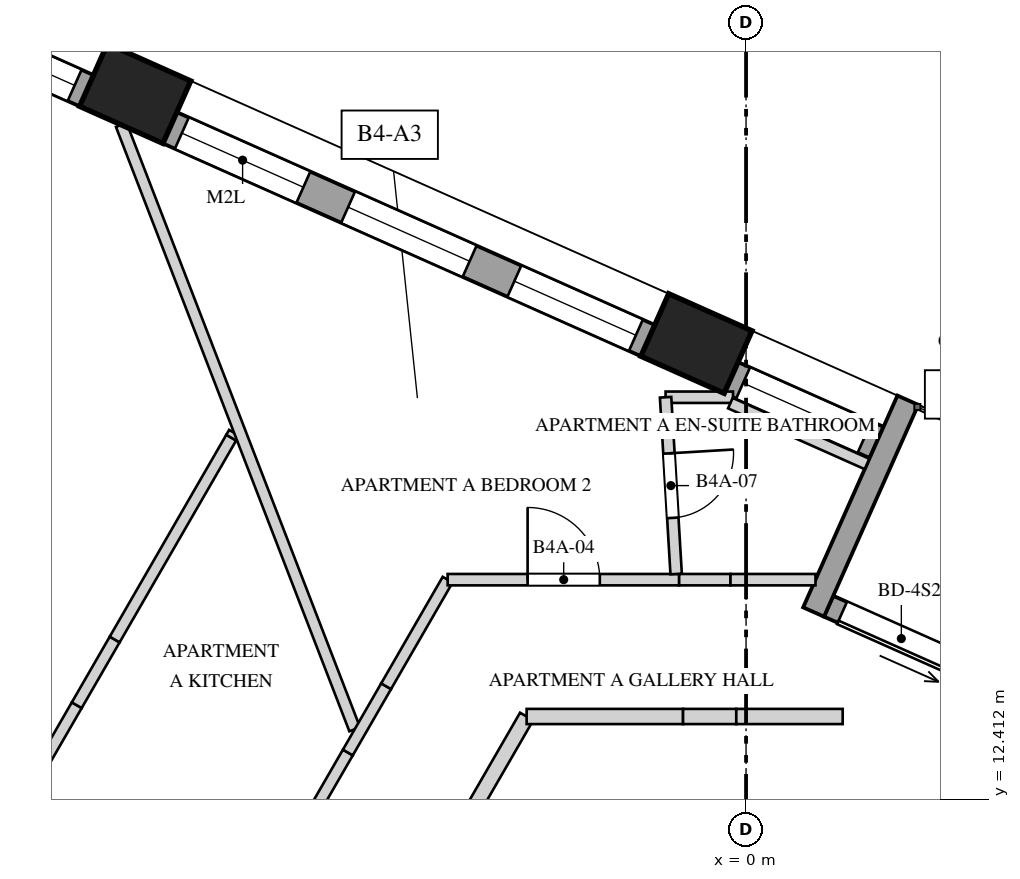
"""IFC4 building model, lengths in metres.
Left out: names, types, materials, properties, quantities, classifications, styles, units other than length and angle.
Written with IfcOpenShell. Run it as: python <this file> out.ifc"""

import sys

from ifc_helpers import new_model, si_unit, direction, frame, frame_2d, origin, origin_2d, place, context, subcontext, project, spatial, rectangle, extrude, element, fill, save


model = new_model("IFC4")
c1 = context("Model", 3, precision=1e-05, world=origin(), true_north=direction((0.0, 1.0)))
c2 = subcontext(c1, "Body", "Model", "MODEL_VIEW")
j1 = project(units=[si_unit("LENGTHUNIT", "METRE"), si_unit("PLANEANGLEUNIT", "RADIAN")], contexts=[c1])
p1 = place(None, origin())
s1 = spatial("IfcSite", under=j1, at=p1, CompositionType="ELEMENT")
p2 = place(p1, origin())
s2 = spatial("IfcBuilding", under=s1, at=p2, CompositionType="ELEMENT")
p3 = place(p2, frame((0.0, 0.0, 162.8)))
s3 = spatial("IfcBuildingStorey", under=s2, at=p3, CompositionType="ELEMENT", Elevation=162.8)
for number, where, z_axis, x_axis in (
    (1, (-0.653, 18.407, -0.35), (0.0, 0.0, 1.0), (-0.914, 0.407, 0.0)),
    (2, (-8.037, 21.694, -0.35), (0.0, 0.0, 1.0), (-0.914, 0.407, 0.0)),
):
    element("IfcColumn", number, at=place(p3, frame(where, z_axis=z_axis, x_axis=x_axis)), inside=s3, PredefinedType="COLUMN", context=c2, shape_type="SweptSolid", body=[
        extrude(rectangle(XDim=1.2, YDim=0.9, at=origin_2d()), origin(), (0.0, 0.0, 1.0), 4.35),
    ])
p4 = place(p3, frame((1.717, 17.105, 0.0), z_axis=(0.0, 0.0, 1.0), x_axis=(-0.913556597974, 0.40671162056, 0.0)))
e3 = element("IfcWall", 3, at=p4, inside=s3, PredefinedType="SOLIDWALL", context=c2, shape_type="SweptSolid", body=[
    extrude(rectangle(XDim=2.094, YDim=0.45, at=frame_2d((1.047, 0.0))), origin(), (0.0, 0.0, 1.0), 3.3),
])
p5 = place(p4, frame((0.172, 0.0, 0.5)))
e4 = element("IfcOpeningElement", 4, at=p5, cuts=e3, PredefinedType="OPENING", context=c2, shape_type="SweptSolid", body=[
    extrude(rectangle(XDim=1.75, YDim=2.65, at=frame_2d((0.875, 1.325))), frame((0.0, 0.235, 0.0), z_axis=(0.0, -1.0, 0.0), x_axis=(1.0, 0.0, 0.0)), (0.0, 0.0, 1.0), 0.47),
])
p6 = place(p3, frame((-1.292, 18.445, 0.0), z_axis=(0.0, 0.0, 1.0), x_axis=(-0.913543675585, 0.40674064562, 0.0)))
e5 = element("IfcWall", 5, at=p6, inside=s3, PredefinedType="SOLIDWALL", context=c2, shape_type="SweptSolid", body=[
    extrude(rectangle(XDim=6.883, YDim=0.45, at=frame_2d((3.441, 0.0))), origin(), (0.0, 0.0, 1.0), 3.3),
])
p7 = place(p6, frame((0.172, 0.0, 0.5)))
e6 = element("IfcOpeningElement", 6, at=p7, cuts=e5, PredefinedType="OPENING", context=c2, shape_type="SweptSolid", body=[
    extrude(rectangle(XDim=1.75, YDim=2.65, at=frame_2d((0.875, 1.325))), frame((0.0, 0.235, 0.0), z_axis=(0.0, -1.0, 0.0), x_axis=(1.0, 0.0, 0.0)), (0.0, 0.0, 1.0), 0.47),
])
p8 = place(p6, frame((2.566, 0.0, 0.5)))
e7 = element("IfcOpeningElement", 7, at=p8, cuts=e5, PredefinedType="OPENING", context=c2, shape_type="SweptSolid", body=[
    extrude(rectangle(XDim=1.75, YDim=2.65, at=frame_2d((0.875, 1.325))), frame((0.0, 0.235, 0.0), z_axis=(0.0, -1.0, 0.0), x_axis=(1.0, 0.0, 0.0)), (0.0, 0.0, 1.0), 0.47),
])
p9 = place(p6, frame((4.961, 0.0, 0.5)))
e8 = element("IfcOpeningElement", 8, at=p9, cuts=e5, PredefinedType="OPENING", context=c2, shape_type="SweptSolid", body=[
    extrude(rectangle(XDim=1.75, YDim=2.0, at=frame_2d((0.875, 1.0))), frame((0.0, 0.235, 0.0), z_axis=(0.0, -1.0, 0.0), x_axis=(1.0, 0.0, 0.0)), (0.0, 0.0, 1.0), 0.47),
])
p10 = place(p3, frame((-8.676, 21.733, 0.0), z_axis=(0.0, 0.0, 1.0), x_axis=(-0.913542682641, 0.406742875773, 0.0)))
e9 = element("IfcWall", 9, at=p10, inside=s3, PredefinedType="SOLIDWALL", context=c2, shape_type="SweptSolid", body=[
    extrude(rectangle(XDim=6.183, YDim=0.45, at=frame_2d((3.092, 0.0))), origin(), (0.0, 0.0, 1.0), 3.3),
])
p11 = place(p10, frame((0.172, 0.0, 0.5)))
e10 = element("IfcOpeningElement", 10, at=p11, cuts=e9, PredefinedType="OPENING", context=c2, shape_type="SweptSolid", body=[
    extrude(rectangle(XDim=1.75, YDim=2.65, at=frame_2d((0.875, 1.325))), frame((0.0, 0.235, 0.0), z_axis=(0.0, -1.0, 0.0), x_axis=(1.0, 0.0, 0.0)), (0.0, 0.0, 1.0), 0.47),
])
p12 = place(p10, frame((2.566, 0.0, 0.5)))
e11 = element("IfcOpeningElement", 11, at=p12, cuts=e9, PredefinedType="OPENING", context=c2, shape_type="SweptSolid", body=[
    extrude(rectangle(XDim=1.75, YDim=2.65, at=frame_2d((0.875, 1.325))), frame((0.0, 0.235, 0.0), z_axis=(0.0, -1.0, 0.0), x_axis=(1.0, 0.0, 0.0)), (0.0, 0.0, 1.0), 0.47),
])
p13 = place(p10, frame((4.936, 0.0, 0.5)))
e12 = element("IfcOpeningElement", 12, at=p13, cuts=e9, PredefinedType="OPENING", context=c2, shape_type="SweptSolid", body=[
    extrude(rectangle(XDim=1.1, YDim=2.0, at=frame_2d((0.55, 1.0))), frame((0.0, 0.235, 0.0), z_axis=(0.0, -1.0, 0.0), x_axis=(1.0, 0.0, 0.0)), (0.0, 0.0, 1.0), 0.47),
])
p14 = place(p3, frame((3.0, 14.099, 0.0), z_axis=(0.0, 0.0, 1.0), x_axis=(-0.913537312596, 0.406754936657, 0.0)))
e13 = element("IfcWall", 13, at=p14, inside=s3, PredefinedType="SOLIDWALL", context=c2, shape_type="SweptSolid", body=[
    extrude(rectangle(XDim=2.094, YDim=0.3, at=frame_2d((1.047, 0.0))), origin(), (0.0, 0.0, 1.0), 3.3),
])
p15 = place(p14, frame((0.197, 0.0, 0.0)))
e14 = element("IfcOpeningElement", 14, at=p15, cuts=e13, PredefinedType="OPENING", context=c2, shape_type="SweptSolid", body=[
    extrude(rectangle(XDim=1.7, YDim=2.45, at=frame_2d((0.85, 1.225))), frame((0.0, 0.16, 0.0), z_axis=(0.0, -1.0, 0.0), x_axis=(1.0, 0.0, 0.0)), (0.0, 0.0, 1.0), 0.32),
])
p16 = place(p3, frame((2.129, 17.661, 0.0), z_axis=(0.0, 0.0, 1.0), x_axis=(-0.406806804169, -0.913514216683, 0.0)))
e15 = element("IfcWall", 15, at=p16, inside=s3, PredefinedType="SOLIDWALL", context=c2, shape_type="SweptSolid", body=[
    extrude(rectangle(XDim=3.05, YDim=0.3, at=frame_2d((1.525, 0.0))), origin(), (0.0, 0.0, 1.0), 3.3),
])
p17 = place(p3, frame((-9.754, 12.005, 0.0), z_axis=(0.0, 0.0, 1.0), x_axis=(0.499971120268, 0.866042076863, 0.0)))
e16 = element("IfcWall", 16, at=p17, inside=s3, PredefinedType="PARTITIONING", context=c2, shape_type="SweptSolid", body=[
    extrude(rectangle(XDim=1.898, YDim=0.15, at=frame_2d((0.949, 0.0))), origin(), (0.0, 0.0, 1.0), 3.65),
])
p18 = place(p3, frame((-8.805, 13.649, 0.0), z_axis=(0.0, 0.0, 1.0), x_axis=(0.499955472713, 0.866051110099, 0.0)))
e17 = element("IfcWall", 17, at=p18, inside=s3, PredefinedType="PARTITIONING", context=c2, shape_type="SweptSolid", body=[
    extrude(rectangle(XDim=0.998, YDim=0.15, at=frame_2d((0.499, 0.0))), origin(), (0.0, 0.0, 1.0), 2.55),
])
p19 = place(p3, frame((-8.307, 14.513, 0.0), z_axis=(0.0, 0.0, 1.0), x_axis=(0.500034855457, 0.866005279042, 0.0)))
e18 = element("IfcWall", 18, at=p19, inside=s3, PredefinedType="PARTITIONING", context=c2, shape_type="SweptSolid", body=[
    extrude(rectangle(XDim=3.067, YDim=0.15, at=frame_2d((1.533, 0.0))), origin(), (0.0, 0.0, 1.0), 3.65),
])
p20 = place(p3, frame((-6.773, 17.168, 0.0), z_axis=(0.0, 0.0, 1.0), x_axis=(0.501423782413, 0.865201820635, 0.0)))
e19 = element("IfcWall", 19, at=p20, inside=s3, PredefinedType="PARTITIONING", context=c2, shape_type="SweptSolid", body=[
    extrude(rectangle(XDim=0.074, YDim=0.15, at=frame_2d((0.037, 0.0))), origin(), (0.0, 0.0, 1.0), 2.75),
])
p21 = place(p3, frame((-9.459, 12.366, 0.0), z_axis=(0.0, 0.0, 1.0), x_axis=(0.664589031093, -0.747209087037, 0.0)))
e20 = element("IfcWall", 20, at=p21, inside=s3, PredefinedType="PARTITIONING", context=c2, shape_type="SweptSolid", body=[
    extrude(rectangle(XDim=3.499, YDim=0.15, at=frame_2d((1.75, 0.0))), origin(), (0.0, 0.0, 1.0), 3.65),
])
p22 = place(p3, frame((-8.742, 7.109, 0.0), z_axis=(0.0, 0.0, 1.0), x_axis=(-0.775864969599, 0.630899000593, 0.0)))
e21 = element("IfcWall", 21, at=p22, inside=s3, PredefinedType="PARTITIONING", context=c2, shape_type="SweptSolid", body=[
    extrude(rectangle(XDim=11.548, YDim=0.15, at=frame_2d((5.774, 0.0))), origin(), (0.0, 0.0, 1.0), 2.55),
])
p23 = place(p3, frame((-8.22, 21.283, 0.0), z_axis=(0.0, 0.0, 1.0), x_axis=(0.360262770677, -0.932850864857, 0.0)))
e22 = element("IfcWall", 22, at=p23, inside=s3, PredefinedType="PARTITIONING", context=c2, shape_type="SweptSolid", body=[
    extrude(rectangle(XDim=8.524, YDim=0.15, at=frame_2d((4.262, 0.0))), origin(), (0.0, 0.0, 1.0), 2.75),
])
p24 = place(p3, frame((-5.848, 11.971, 0.0), z_axis=(0.0, 0.0, 1.0), x_axis=(0.500017246033, 0.866015446554, 0.0)))
e23 = element("IfcWall", 23, at=p24, inside=s3, PredefinedType="PARTITIONING", context=c2, shape_type="SweptSolid", body=[
    extrude(rectangle(XDim=1.219, YDim=0.15, at=frame_2d((0.609, 0.0))), origin(), (0.0, 0.0, 1.0), 3.65),
])
p25 = place(p3, frame((-5.239, 13.026, 0.0), z_axis=(0.0, 0.0, 1.0), x_axis=(0.499946326053, 0.866056390234, 0.0)))
e24 = element("IfcWall", 24, at=p25, inside=s3, PredefinedType="PARTITIONING", context=c2, shape_type="SweptSolid", body=[
    extrude(rectangle(XDim=1.007, YDim=0.15, at=frame_2d((0.503, 0.0))), origin(), (0.0, 0.0, 1.0), 2.75),
])
p26 = place(p3, frame((-4.735, 13.898, 0.0), z_axis=(0.0, 0.0, 1.0), x_axis=(0.499983569942, 0.866034889475, 0.0)))
e25 = element("IfcWall", 25, at=p26, inside=s3, PredefinedType="PARTITIONING", context=c2, shape_type="SweptSolid", body=[
    extrude(rectangle(XDim=1.619, YDim=0.15, at=frame_2d((0.809, 0.0))), origin(), (0.0, 0.0, 1.0), 3.65),
])
p27 = place(p3, frame((-3.926, 15.3, 0.0), z_axis=(0.0, 0.0, 1.0), x_axis=(1.0, 0.0, 0.0)))
e26 = element("IfcWall", 26, at=p27, inside=s3, PredefinedType="PARTITIONING", context=c2, shape_type="SweptSolid", body=[
    extrude(rectangle(XDim=3.046, YDim=0.15, at=frame_2d((1.523, 0.0))), origin(), (0.0, 0.0, 1.0), 3.65),
])
p28 = place(p27, frame((1.052, 0.0, 0.0)))
e27 = element("IfcOpeningElement", 27, at=p28, cuts=e26, PredefinedType="OPENING", context=c2, shape_type="SweptSolid", body=[
    extrude(rectangle(XDim=0.95, YDim=2.4, at=frame_2d((0.475, 1.2))), frame((0.0, 0.085, 0.0), z_axis=(0.0, -1.0, 0.0), x_axis=(1.0, 0.0, 0.0)), (0.0, 0.0, 1.0), 0.17),
])
p29 = place(p3, frame((-0.88, 15.3, 0.0), z_axis=(0.0, 0.0, 1.0), x_axis=(1.0, 0.0, 0.0)))
e28 = element("IfcWall", 28, at=p29, inside=s3, PredefinedType="PARTITIONING", context=c2, shape_type="SweptSolid", body=[
    extrude(rectangle(XDim=0.675, YDim=0.15, at=frame_2d((0.338, 0.0))), origin(), (0.0, 0.0, 1.0), 2.95),
])
p30 = place(p3, frame((-0.205, 15.3, 0.0), z_axis=(0.0, 0.0, 1.0), x_axis=(1.0, 0.0, 0.0)))
e29 = element("IfcWall", 29, at=p30, inside=s3, PredefinedType="PARTITIONING", context=c2, shape_type="SweptSolid", body=[
    extrude(rectangle(XDim=1.118, YDim=0.15, at=frame_2d((0.559, 0.0))), origin(), (0.0, 0.0, 1.0), 3.65),
])
p31 = place(p3, frame((-1.059, 17.7, 0.0), z_axis=(0.0, 0.0, 1.0), x_axis=(1.0, 0.0, 0.0)))
e30 = element("IfcWall", 30, at=p31, inside=s3, PredefinedType="PARTITIONING", context=c2, shape_type="SweptSolid", body=[
    extrude(rectangle(XDim=0.887, YDim=0.15, at=frame_2d((0.444, 0.0))), origin(), (0.0, 0.0, 1.0), 2.95),
])
p32 = place(p3, frame((-1.059, 17.7, 0.0), z_axis=(0.0, 0.0, 1.0), x_axis=(0.059643707448, -0.998219729399, 0.0)))
e31 = element("IfcWall", 31, at=p32, inside=s3, PredefinedType="PARTITIONING", context=c2, shape_type="SweptSolid", body=[
    extrude(rectangle(XDim=2.329, YDim=0.15, at=frame_2d((1.165, 0.0))), origin(), (0.0, 0.0, 1.0), 3.65),
])
p33 = place(p32, frame((0.74, 0.0, 0.0)))
e32 = element("IfcOpeningElement", 32, at=p33, cuts=e31, PredefinedType="OPENING", context=c2, shape_type="SweptSolid", body=[
    extrude(rectangle(XDim=0.85, YDim=2.4, at=frame_2d((0.425, 1.2))), frame((0.0, 0.085, 0.0), z_axis=(0.0, -1.0, 0.0), x_axis=(1.0, 0.0, 0.0)), (0.0, 0.0, 1.0), 0.17),
])
p34 = place(p3, frame((-0.206, 17.622, 0.0), z_axis=(0.0, 0.0, 1.0), x_axis=(0.91356059905, -0.406702633214, 0.0)))
e33 = element("IfcWall", 33, at=p34, inside=s3, PredefinedType="PARTITIONING", context=c2, shape_type="SweptSolid", body=[
    extrude(rectangle(XDim=1.967, YDim=0.15, at=frame_2d((0.983, 0.0))), origin(), (0.0, 0.0, 1.0), 3.65),
])
p35 = place(p3, frame((-3.915, 11.719, 0.0), z_axis=(0.0, 0.0, 1.0), x_axis=(0.499982825521, 0.866035319247, 0.0)))
e34 = element("IfcWall", 34, at=p35, inside=s3, PredefinedType="SOLIDWALL", context=c2, shape_type="SweptSolid", body=[
    extrude(rectangle(XDim=2.056, YDim=0.2, at=frame_2d((1.028, 0.0))), origin(), (0.0, 0.0, 1.0), 3.65),
])
p36 = place(p3, frame((-2.887, 13.5, 0.0), z_axis=(0.0, 0.0, 1.0), x_axis=(1.0, 0.0, 0.0)))
e35 = element("IfcWall", 35, at=p36, inside=s3, PredefinedType="SOLIDWALL", context=c2, shape_type="SweptSolid", body=[
    extrude(rectangle(XDim=2.058, YDim=0.2, at=frame_2d((1.029, 0.0))), origin(), (0.0, 0.0, 1.0), 3.65),
])
p37 = place(p3, frame((-0.829, 13.5, 0.0), z_axis=(0.0, 0.0, 1.0), x_axis=(1.0, 0.0, 0.0)))
e36 = element("IfcWall", 36, at=p37, inside=s3, PredefinedType="SOLIDWALL", context=c2, shape_type="SweptSolid", body=[
    extrude(rectangle(XDim=0.7, YDim=0.2, at=frame_2d((0.35, 0.0))), origin(), (0.0, 0.0, 1.0), 2.95),
])
p38 = place(p3, frame((-0.128, 13.5, 0.0), z_axis=(0.0, 0.0, 1.0), x_axis=(1.0, 0.0, 0.0)))
e37 = element("IfcWall", 37, at=p38, inside=s3, PredefinedType="SOLIDWALL", context=c2, shape_type="SweptSolid", body=[
    extrude(rectangle(XDim=1.4, YDim=0.2, at=frame_2d((0.7, 0.0))), origin(), (0.0, 0.0, 1.0), 3.65),
])
p39 = place(p5, origin())
e38 = element("IfcWindow", 38, at=p39, inside=s3, PartitioningType="SINGLE_PANEL", PredefinedType="WINDOW", context=c2, shape_type="SweptSolid", body=[
    extrude(rectangle(XDim=1.75, YDim=2.65, at=frame_2d((0.875, 1.325))), frame((0.0, 0.03, 0.0), z_axis=(0.0, -1.0, 0.0), x_axis=(1.0, 0.0, 0.0)), (0.0, 0.0, 1.0), 0.06),
])
fill(e4, e38)
p40 = place(p7, origin())
e39 = element("IfcWindow", 39, at=p40, inside=s3, PartitioningType="SINGLE_PANEL", PredefinedType="WINDOW", context=c2, shape_type="SweptSolid", body=[
    extrude(rectangle(XDim=1.75, YDim=2.65, at=frame_2d((0.875, 1.325))), frame((0.0, 0.03, 0.0), z_axis=(0.0, -1.0, 0.0), x_axis=(1.0, 0.0, 0.0)), (0.0, 0.0, 1.0), 0.06),
])
fill(e6, e39)
p41 = place(p8, origin())
e40 = element("IfcWindow", 40, at=p41, inside=s3, PartitioningType="SINGLE_PANEL", PredefinedType="WINDOW", context=c2, shape_type="SweptSolid", body=[
    extrude(rectangle(XDim=1.75, YDim=2.65, at=frame_2d((0.875, 1.325))), frame((0.0, 0.03, 0.0), z_axis=(0.0, -1.0, 0.0), x_axis=(1.0, 0.0, 0.0)), (0.0, 0.0, 1.0), 0.06),
])
fill(e7, e40)
p42 = place(p9, origin())
e41 = element("IfcWindow", 41, at=p42, inside=s3, PartitioningType="SINGLE_PANEL", PredefinedType="WINDOW", context=c2, shape_type="SweptSolid", body=[
    extrude(rectangle(XDim=1.75, YDim=2.0, at=frame_2d((0.875, 1.0))), frame((0.0, 0.03, 0.0), z_axis=(0.0, -1.0, 0.0), x_axis=(1.0, 0.0, 0.0)), (0.0, 0.0, 1.0), 0.06),
])
fill(e8, e41)
p43 = place(p11, origin())
e42 = element("IfcWindow", 42, at=p43, inside=s3, PartitioningType="SINGLE_PANEL", PredefinedType="WINDOW", context=c2, shape_type="SweptSolid", body=[
    extrude(rectangle(XDim=1.75, YDim=2.65, at=frame_2d((0.875, 1.325))), frame((0.0, 0.03, 0.0), z_axis=(0.0, -1.0, 0.0), x_axis=(1.0, 0.0, 0.0)), (0.0, 0.0, 1.0), 0.06),
])
fill(e10, e42)
p44 = place(p15, origin())
e43 = element("IfcDoor", 43, at=p44, inside=s3, OperationType="SLIDING_TO_LEFT", PredefinedType="DOOR", context=c2, shape_type="SweptSolid", body=[
    extrude(rectangle(XDim=1.7, YDim=2.45, at=frame_2d((0.85, 1.225))), frame((0.0, 0.025, 0.0), z_axis=(0.0, -1.0, 0.0), x_axis=(1.0, 0.0, 0.0)), (0.0, 0.0, 1.0), 0.05),
])
fill(e14, e43)
p45 = place(p28, origin())
e44 = element("IfcDoor", 44, at=p45, inside=s3, OperationType="SINGLE_SWING_RIGHT", PredefinedType="DOOR", context=c2, shape_type="SweptSolid", body=[
    extrude(rectangle(XDim=0.95, YDim=2.4, at=frame_2d((0.475, 1.2))), frame((0.0, 0.025, 0.0), z_axis=(0.0, -1.0, 0.0), x_axis=(1.0, 0.0, 0.0)), (0.0, 0.0, 1.0), 0.05),
])
fill(e27, e44)
p46 = place(p33, origin())
e45 = element("IfcDoor", 45, at=p46, inside=s3, OperationType="SINGLE_SWING_LEFT", PredefinedType="DOOR", context=c2, shape_type="SweptSolid", body=[
    extrude(rectangle(XDim=0.85, YDim=2.4, at=frame_2d((0.425, 1.2))), frame((0.0, 0.025, 0.0), z_axis=(0.0, -1.0, 0.0), x_axis=(1.0, 0.0, 0.0)), (0.0, 0.0, 1.0), 0.05),
])
fill(e32, e45)
save(model, sys.argv[1])
